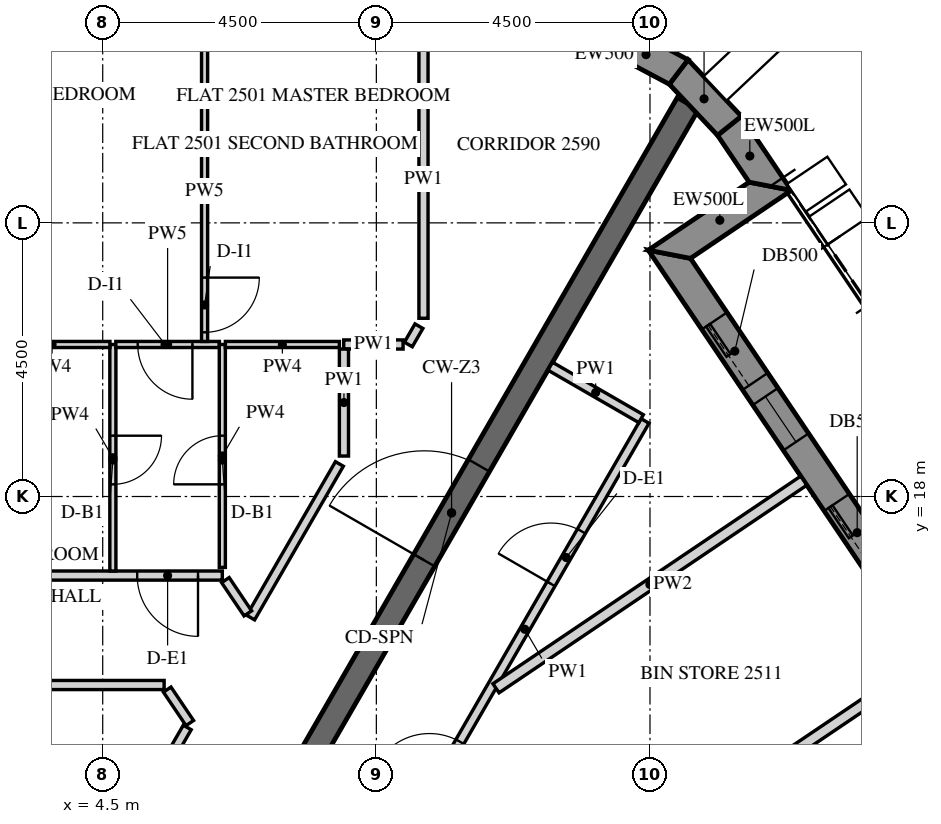
"""IFC4 building model, lengths in metres.
Left out: names, types, materials, properties, quantities, classifications, styles, units other than length and angle.
Written with IfcOpenShell. Run it as: python <this file> out.ifc"""

import sys

from ifc_helpers import new_model, si_unit, direction, frame, frame_2d, origin, place, context, subcontext, project, spatial, polyline, rectangle, outline, extrude, element, fill, save


model = new_model("IFC4")
c1 = context("Model", 3, precision=1e-05, world=origin(), true_north=direction((0.0, 1.0)))
c2 = subcontext(c1, "Body", "Model", "MODEL_VIEW")
j1 = project(units=[si_unit("LENGTHUNIT", "METRE"), si_unit("PLANEANGLEUNIT", "RADIAN")], contexts=[c1])
p1 = place(None, origin())
s1 = spatial("IfcSite", under=j1, at=p1, CompositionType="ELEMENT")
p2 = place(p1, origin())
s2 = spatial("IfcBuilding", under=s1, at=p2, CompositionType="ELEMENT")
p3 = place(p2, frame((0.0, 0.0, 314.7)))
s3 = spatial("IfcBuildingStorey", under=s2, at=p3, CompositionType="ELEMENT", Elevation=314.7)
p4 = place(p3, frame((26.706, 2.879, -0.15), z_axis=(0.0, 0.0, 1.0), x_axis=(-0.559197891507, 0.829034208061, 0.0)))
e1 = element("IfcWall", 1, at=p4, inside=s3, PredefinedType="SOLIDWALL", context=c2, shape_type="SweptSolid", body=[
    extrude(outline(polyline([(0.25, -0.25), (22.795, -0.25), (23.295, 0.25), (-0.25, 0.25), (0.25, -0.25)])), origin(), (0.0, 0.0, 1.0), 3.9),
])
p5 = place(p4, frame((1.323, 0.0, 1.05)))
e2 = element("IfcOpeningElement", 2, at=p5, cuts=e1, PredefinedType="OPENING", context=c2, shape_type="SweptSolid", body=[
    extrude(rectangle(XDim=0.9, YDim=1.5, at=frame_2d((0.45, 0.75))), frame((0.0, 0.26, 0.0), z_axis=(0.0, -1.0, 0.0), x_axis=(1.0, 0.0, 0.0)), (0.0, 0.0, 1.0), 0.52),
])
p6 = place(p4, frame((2.522, 0.0, 0.15)))
e3 = element("IfcOpeningElement", 3, at=p6, cuts=e1, PredefinedType="OPENING", context=c2, shape_type="SweptSolid", body=[
    extrude(rectangle(XDim=1.2, YDim=2.4, at=frame_2d((0.6, 1.2))), frame((0.0, 0.26, 0.0), z_axis=(0.0, -1.0, 0.0), x_axis=(1.0, 0.0, 0.0)), (0.0, 0.0, 1.0), 0.52),
])
p7 = place(p4, frame((4.922, 0.0, 1.05)))
e4 = element("IfcOpeningElement", 4, at=p7, cuts=e1, PredefinedType="OPENING", context=c2, shape_type="SweptSolid", body=[
    extrude(rectangle(XDim=0.9, YDim=1.5, at=frame_2d((0.45, 0.75))), frame((0.0, 0.26, 0.0), z_axis=(0.0, -1.0, 0.0), x_axis=(1.0, 0.0, 0.0)), (0.0, 0.0, 1.0), 0.52),
])
p8 = place(p4, frame((6.122, 0.0, 0.15)))
e5 = element("IfcOpeningElement", 5, at=p8, cuts=e1, PredefinedType="OPENING", context=c2, shape_type="SweptSolid", body=[
    extrude(rectangle(XDim=1.2, YDim=2.4, at=frame_2d((0.6, 1.2))), frame((0.0, 0.26, 0.0), z_axis=(0.0, -1.0, 0.0), x_axis=(1.0, 0.0, 0.0)), (0.0, 0.0, 1.0), 0.52),
])
p9 = place(p4, frame((8.522, 0.0, 1.05)))
e6 = element("IfcOpeningElement", 6, at=p9, cuts=e1, PredefinedType="OPENING", context=c2, shape_type="SweptSolid", body=[
    extrude(rectangle(XDim=0.9, YDim=1.5, at=frame_2d((0.45, 0.75))), frame((0.0, 0.26, 0.0), z_axis=(0.0, -1.0, 0.0), x_axis=(1.0, 0.0, 0.0)), (0.0, 0.0, 1.0), 0.52),
])
p10 = place(p4, frame((9.722, 0.0, 0.15)))
e7 = element("IfcOpeningElement", 7, at=p10, cuts=e1, PredefinedType="OPENING", context=c2, shape_type="SweptSolid", body=[
    extrude(rectangle(XDim=1.2, YDim=2.4, at=frame_2d((0.6, 1.2))), frame((0.0, 0.26, 0.0), z_axis=(0.0, -1.0, 0.0), x_axis=(1.0, 0.0, 0.0)), (0.0, 0.0, 1.0), 0.52),
])
p11 = place(p4, frame((12.122, 0.0, 1.05)))
e8 = element("IfcOpeningElement", 8, at=p11, cuts=e1, PredefinedType="OPENING", context=c2, shape_type="SweptSolid", body=[
    extrude(rectangle(XDim=0.9, YDim=1.5, at=frame_2d((0.45, 0.75))), frame((0.0, 0.26, 0.0), z_axis=(0.0, -1.0, 0.0), x_axis=(1.0, 0.0, 0.0)), (0.0, 0.0, 1.0), 0.52),
])
p12 = place(p4, frame((13.323, 0.0, 0.15)))
e9 = element("IfcOpeningElement", 9, at=p12, cuts=e1, PredefinedType="OPENING", context=c2, shape_type="SweptSolid", body=[
    extrude(rectangle(XDim=1.2, YDim=2.4, at=frame_2d((0.6, 1.2))), frame((0.0, 0.26, 0.0), z_axis=(0.0, -1.0, 0.0), x_axis=(1.0, 0.0, 0.0)), (0.0, 0.0, 1.0), 0.52),
])
p13 = place(p4, frame((15.722, 0.0, 1.05)))
e10 = element("IfcOpeningElement", 10, at=p13, cuts=e1, PredefinedType="OPENING", context=c2, shape_type="SweptSolid", body=[
    extrude(rectangle(XDim=0.9, YDim=1.5, at=frame_2d((0.45, 0.75))), frame((0.0, 0.26, 0.0), z_axis=(0.0, -1.0, 0.0), x_axis=(1.0, 0.0, 0.0)), (0.0, 0.0, 1.0), 0.52),
])
p14 = place(p4, frame((16.922, 0.0, 0.15)))
e11 = element("IfcOpeningElement", 11, at=p14, cuts=e1, PredefinedType="OPENING", context=c2, shape_type="SweptSolid", body=[
    extrude(rectangle(XDim=1.2, YDim=2.4, at=frame_2d((0.6, 1.2))), frame((0.0, 0.26, 0.0), z_axis=(0.0, -1.0, 0.0), x_axis=(1.0, 0.0, 0.0)), (0.0, 0.0, 1.0), 0.52),
])
p15 = place(p4, frame((19.323, 0.0, 1.05)))
e12 = element("IfcOpeningElement", 12, at=p15, cuts=e1, PredefinedType="OPENING", context=c2, shape_type="SweptSolid", body=[
    extrude(rectangle(XDim=0.9, YDim=1.5, at=frame_2d((0.45, 0.75))), frame((0.0, 0.26, 0.0), z_axis=(0.0, -1.0, 0.0), x_axis=(1.0, 0.0, 0.0)), (0.0, 0.0, 1.0), 0.52),
])
p16 = place(p4, frame((20.522, 0.0, 0.15)))
e13 = element("IfcOpeningElement", 13, at=p16, cuts=e1, PredefinedType="OPENING", context=c2, shape_type="SweptSolid", body=[
    extrude(rectangle(XDim=1.2, YDim=2.4, at=frame_2d((0.6, 1.2))), frame((0.0, 0.26, 0.0), z_axis=(0.0, -1.0, 0.0), x_axis=(1.0, 0.0, 0.0)), (0.0, 0.0, 1.0), 0.52),
])
p17 = place(p3, frame((13.819, 21.984, -0.15), z_axis=(0.0, 0.0, 1.0), x_axis=(0.829052389485, 0.559170935841, 0.0)))
e14 = element("IfcWall", 14, at=p17, inside=s3, PredefinedType="SOLIDWALL", context=c2, shape_type="SweptSolid", body=[
    extrude(outline(polyline([(0.25, -0.25), (2.25, -0.25), (1.75, 0.25), (-0.25, 0.25), (0.25, -0.25)])), origin(), (0.0, 0.0, 1.0), 3.9),
])
p18 = place(p3, frame((15.478, 23.102, -0.15), z_axis=(0.0, 0.0, 1.0), x_axis=(-0.559245726333, 0.829001940636, 0.0)))
e15 = element("IfcWall", 15, at=p18, inside=s3, PredefinedType="SOLIDWALL", context=c2, shape_type="SweptSolid", body=[
    extrude(outline(polyline([(-0.25, -0.25), (1.221, -0.25), (1.18, 0.25), (0.25, 0.25), (-0.25, -0.25)])), origin(), (0.0, 0.0, 1.0), 3.9),
])
p19 = place(p3, frame((14.806, 24.097, -0.15), z_axis=(0.0, 0.0, 1.0), x_axis=(-0.686234452793, 0.727380420275, 0.0)))
e16 = element("IfcWall", 16, at=p19, inside=s3, PredefinedType="SOLIDWALL", context=c2, shape_type="SweptSolid", body=[
    extrude(outline(polyline([(-0.021, -0.25), (1.257, -0.25), (1.175, 0.25), (0.021, 0.25), (-0.021, -0.25)])), origin(), (0.0, 0.0, 1.0), 3.9),
])
p20 = place(p3, frame((13.972, 24.982, -0.15), z_axis=(0.0, 0.0, 1.0), x_axis=(-0.882902492938, 0.469556373575, 0.0)))
e17 = element("IfcWall", 17, at=p20, inside=s3, PredefinedType="SOLIDWALL", context=c2, shape_type="SweptSolid", body=[
    extrude(outline(polyline([(-0.041, -0.25), (1.257, -0.25), (1.175, 0.25), (0.041, 0.25), (-0.041, -0.25)])), origin(), (0.0, 0.0, 1.0), 3.9),
])
p21 = place(p3, frame((6.351, 11.0, -0.15), z_axis=(0.0, 0.0, 1.0), x_axis=(0.499998894578, 0.866026041999, 0.0)))
e18 = element("IfcWall", 18, at=p21, inside=s3, PredefinedType="SHEAR", context=c2, shape_type="SweptSolid", body=[
    extrude(rectangle(XDim=15.544, YDim=0.4, at=frame_2d((7.772, 0.0))), origin(), (0.0, 0.0, 1.0), 3.9),
])
p22 = place(p21, frame((6.872, 0.0, 0.15)))
e19 = element("IfcOpeningElement", 19, at=p22, cuts=e18, PredefinedType="OPENING", context=c2, shape_type="SweptSolid", body=[
    extrude(rectangle(XDim=1.8, YDim=2.4, at=frame_2d((0.9, 1.2))), frame((0.0, 0.21, 0.0), z_axis=(0.0, -1.0, 0.0), x_axis=(1.0, 0.0, 0.0)), (0.0, 0.0, 1.0), 0.42),
])
p23 = place(p3, frame((6.467, 16.7, 0.0), z_axis=(0.0, 0.0, 1.0), x_axis=(-1.0, 0.0, 0.0)))
e20 = element("IfcWall", 20, at=p23, inside=s3, PredefinedType="PARTITIONING", context=c2, shape_type="SweptSolid", body=[
    extrude(rectangle(XDim=14.677, YDim=0.15, at=frame_2d((7.339, 0.0))), origin(), (0.0, 0.0, 1.0), 2.988),
])
p24 = place(p23, frame((0.4, 0.0, 0.0)))
e21 = element("IfcOpeningElement", 21, at=p24, cuts=e20, PredefinedType="OPENING", context=c2, shape_type="SweptSolid", body=[
    extrude(rectangle(XDim=1.0, YDim=2.1, at=frame_2d((0.5, 1.05))), frame((0.0, 0.085, 0.0), z_axis=(0.0, -1.0, 0.0), x_axis=(1.0, 0.0, 0.0)), (0.0, 0.0, 1.0), 0.17),
])
p25 = place(p23, frame((13.527, 0.0, 0.0)))
e22 = element("IfcOpeningElement", 22, at=p25, cuts=e20, PredefinedType="OPENING", context=c2, shape_type="SweptSolid", body=[
    extrude(rectangle(XDim=1.0, YDim=2.1, at=frame_2d((0.5, 1.05))), frame((0.0, 0.085, 0.0), z_axis=(0.0, -1.0, 0.0), x_axis=(1.0, 0.0, 0.0)), (0.0, 0.0, 1.0), 0.17),
])
p26 = place(p3, frame((9.775, 25.5, 0.0), z_axis=(0.0, 0.0, 1.0), x_axis=(0.0, -1.0, 0.0)))
e23 = element("IfcWall", 23, at=p26, inside=s3, PredefinedType="PARTITIONING", context=c2, shape_type="SweptSolid", body=[
    extrude(rectangle(XDim=4.569, YDim=0.15, at=frame_2d((2.284, 0.0))), origin(), (0.0, 0.0, 1.0), 2.988),
])
p27 = place(p3, frame((9.7, 20.801, 0.0), z_axis=(0.0, 0.0, 1.0), x_axis=(-0.499762962979, -0.866162213927, 0.0)))
e24 = element("IfcWall", 24, at=p27, inside=s3, PredefinedType="PARTITIONING", context=c2, shape_type="SweptSolid", body=[
    extrude(rectangle(XDim=0.348, YDim=0.15, at=frame_2d((0.174, 0.0))), origin(), (0.0, 0.0, 1.0), 2.988),
])
p28 = place(p3, frame((9.44, 20.5, 0.0), z_axis=(0.0, 0.0, 1.0), x_axis=(-1.0, 0.0, 0.0)))
e25 = element("IfcWall", 25, at=p28, inside=s3, PredefinedType="PARTITIONING", context=c2, shape_type="SweptSolid", body=[
    extrude(rectangle(XDim=0.976, YDim=0.15, at=frame_2d((0.488, 0.0))), origin(), (0.0, 0.0, 1.0), 2.988),
])
p29 = place(p3, frame((8.467, 20.425, 0.0), z_axis=(0.0, 0.0, 1.0), x_axis=(0.0, -1.0, 0.0)))
e26 = element("IfcWall", 26, at=p29, inside=s3, PredefinedType="PARTITIONING", context=c2, shape_type="SweptSolid", body=[
    extrude(rectangle(XDim=1.76, YDim=0.15, at=frame_2d((0.88, 0.0))), origin(), (0.0, 0.0, 1.0), 2.988),
])
p30 = place(p3, frame((8.392, 18.536, 0.0), z_axis=(0.0, 0.0, 1.0), x_axis=(-0.49996389635, -0.866046247233, 0.0)))
e27 = element("IfcWall", 27, at=p30, inside=s3, PredefinedType="PARTITIONING", context=c2, shape_type="SweptSolid", body=[
    extrude(rectangle(XDim=2.918, YDim=0.15, at=frame_2d((1.459, 0.0))), origin(), (0.0, 0.0, 1.0), 2.988),
])
p31 = place(p3, frame((6.887, 16.078, 0.0), z_axis=(0.0, 0.0, 1.0), x_axis=(-0.559472855001, 0.828848674076, 0.0)))
e28 = element("IfcWall", 28, at=p31, inside=s3, PredefinedType="PARTITIONING", context=c2, shape_type="SweptSolid", body=[
    extrude(rectangle(XDim=0.66, YDim=0.15, at=frame_2d((0.33, 0.0))), origin(), (0.0, 0.0, 1.0), 2.988),
])
p32 = place(p3, frame((-7.002, 14.9, 0.0), z_axis=(0.0, 0.0, 1.0), x_axis=(1.0, 0.0, 0.0)))
e29 = element("IfcWall", 29, at=p32, inside=s3, PredefinedType="PARTITIONING", context=c2, shape_type="SweptSolid", body=[
    extrude(rectangle(XDim=12.512, YDim=0.15, at=frame_2d((6.256, 0.0))), origin(), (0.0, 0.0, 1.0), 2.988),
])
p33 = place(p32, frame((5.806, 0.0, 0.0)))
e30 = element("IfcOpeningElement", 30, at=p33, cuts=e29, PredefinedType="OPENING", context=c2, shape_type="SweptSolid", body=[
    extrude(rectangle(XDim=0.9, YDim=2.1, at=frame_2d((0.45, 1.05))), frame((0.0, 0.085, 0.0), z_axis=(0.0, -1.0, 0.0), x_axis=(1.0, 0.0, 0.0)), (0.0, 0.0, 1.0), 0.17),
])
p34 = place(p3, frame((5.561, 14.825, 0.0), z_axis=(0.0, 0.0, 1.0), x_axis=(0.559188682258, -0.829040419784, 0.0)))
e31 = element("IfcWall", 31, at=p34, inside=s3, PredefinedType="PARTITIONING", context=c2, shape_type="SweptSolid", body=[
    extrude(rectangle(XDim=0.664, YDim=0.15, at=frame_2d((0.332, 0.0))), origin(), (0.0, 0.0, 1.0), 2.988),
])
p35 = place(p3, frame((5.89, 14.202, 0.0), z_axis=(0.0, 0.0, 1.0), x_axis=(-0.499986987217, -0.866032916588, 0.0)))
e32 = element("IfcWall", 32, at=p35, inside=s3, PredefinedType="PARTITIONING", context=c2, shape_type="SweptSolid", body=[
    extrude(rectangle(XDim=1.092, YDim=0.15, at=frame_2d((0.546, 0.0))), origin(), (0.0, 0.0, 1.0), 2.988),
])
p36 = place(p3, frame((9.464, 12.392, 0.0), z_axis=(0.0, 0.0, 1.0), x_axis=(0.499999400414, 0.866025749955, 0.0)))
e33 = element("IfcWall", 33, at=p36, inside=s3, PredefinedType="PARTITIONING", context=c2, shape_type="SweptSolid", body=[
    extrude(rectangle(XDim=7.911, YDim=0.15, at=frame_2d((3.955, 0.0))), origin(), (0.0, 0.0, 1.0), 2.988),
])
p37 = place(p36, frame((0.82, 0.0, 0.0)))
e34 = element("IfcOpeningElement", 34, at=p37, cuts=e33, PredefinedType="OPENING", context=c2, shape_type="SweptSolid", body=[
    extrude(rectangle(XDim=1.0, YDim=2.1, at=frame_2d((0.5, 1.05))), frame((0.0, 0.085, 0.0), z_axis=(0.0, -1.0, 0.0), x_axis=(1.0, 0.0, 0.0)), (0.0, 0.0, 1.0), 0.17),
])
p38 = place(p36, frame((4.817, 0.0, 0.0)))
e35 = element("IfcOpeningElement", 35, at=p38, cuts=e33, PredefinedType="OPENING", context=c2, shape_type="SweptSolid", body=[
    extrude(rectangle(XDim=1.0, YDim=2.1, at=frame_2d((0.5, 1.05))), frame((0.0, 0.085, 0.0), z_axis=(0.0, -1.0, 0.0), x_axis=(1.0, 0.0, 0.0)), (0.0, 0.0, 1.0), 0.17),
])
p39 = place(p3, frame((13.354, 19.28, 0.0), z_axis=(0.0, 0.0, 1.0), x_axis=(-0.866074815912, 0.499914405916, 0.0)))
e36 = element("IfcWall", 36, at=p39, inside=s3, PredefinedType="PARTITIONING", context=c2, shape_type="SweptSolid", body=[
    extrude(rectangle(XDim=1.725, YDim=0.15, at=frame_2d((0.862, 0.0))), origin(), (0.0, 0.0, 1.0), 2.988),
])
p40 = place(p3, frame((4.667, 20.5, 0.0), z_axis=(0.0, 0.0, 1.0), x_axis=(0.0, -1.0, 0.0)))
e37 = element("IfcWall", 37, at=p40, inside=s3, PredefinedType="PARTITIONING", context=c2, shape_type="SweptSolid", body=[
    extrude(rectangle(XDim=3.725, YDim=0.1, at=frame_2d((1.863, 0.0))), origin(), (0.0, 0.0, 1.0), 2.988),
])
p41 = place(p40, frame((1.5, 0.0, 0.0)))
e38 = element("IfcOpeningElement", 38, at=p41, cuts=e37, PredefinedType="OPENING", context=c2, shape_type="SweptSolid", body=[
    extrude(rectangle(XDim=0.8, YDim=2.1, at=frame_2d((0.4, 1.05))), frame((0.0, 0.06, 0.0), z_axis=(0.0, -1.0, 0.0), x_axis=(1.0, 0.0, 0.0)), (0.0, 0.0, 1.0), 0.12),
])
p42 = place(p3, frame((6.419, 20.5, 0.0), z_axis=(0.0, 0.0, 1.0), x_axis=(-1.0, 0.0, 0.0)))
e39 = element("IfcWall", 39, at=p42, inside=s3, PredefinedType="PARTITIONING", context=c2, shape_type="SweptSolid", body=[
    extrude(rectangle(XDim=1.704, YDim=0.1, at=frame_2d((0.852, 0.0))), origin(), (0.0, 0.0, 1.0), 2.988),
])
p43 = place(p42, frame((0.444, 0.0, 0.0)))
e40 = element("IfcOpeningElement", 40, at=p43, cuts=e39, PredefinedType="OPENING", context=c2, shape_type="SweptSolid", body=[
    extrude(rectangle(XDim=0.9, YDim=2.1, at=frame_2d((0.45, 1.05))), frame((0.0, 0.06, 0.0), z_axis=(0.0, -1.0, 0.0), x_axis=(1.0, 0.0, 0.0)), (0.0, 0.0, 1.0), 0.12),
])
p44 = place(p3, frame((6.467, 16.834, 0.0), z_axis=(0.0, 0.0, 1.0), x_axis=(0.0, 1.0, 0.0)))
e41 = element("IfcWall", 41, at=p44, inside=s3, PredefinedType="PARTITIONING", context=c2, shape_type="SweptSolid", body=[
    extrude(rectangle(XDim=3.666, YDim=0.1, at=frame_2d((1.833, 0.0))), origin(), (0.0, 0.0, 1.0), 2.988),
])
p45 = place(p44, frame((1.366, 0.0, 0.0)))
e42 = element("IfcOpeningElement", 42, at=p45, cuts=e41, PredefinedType="OPENING", context=c2, shape_type="SweptSolid", body=[
    extrude(rectangle(XDim=0.8, YDim=2.1, at=frame_2d((0.4, 1.05))), frame((0.0, 0.06, 0.0), z_axis=(0.0, -1.0, 0.0), x_axis=(1.0, 0.0, 0.0)), (0.0, 0.0, 1.0), 0.12),
])
p46 = place(p3, frame((4.619, 20.5, 0.0), z_axis=(0.0, 0.0, 1.0), x_axis=(-1.0, 0.0, 0.0)))
e43 = element("IfcWall", 43, at=p46, inside=s3, PredefinedType="PARTITIONING", context=c2, shape_type="SweptSolid", body=[
    extrude(rectangle(XDim=1.904, YDim=0.1, at=frame_2d((0.952, 0.0))), origin(), (0.0, 0.0, 1.0), 2.988),
])
p47 = place(p3, frame((6.175, 25.5, 0.0), z_axis=(0.0, 0.0, 1.0), x_axis=(0.0, -1.0, 0.0)))
e44 = element("IfcWall", 44, at=p47, inside=s3, PredefinedType="PARTITIONING", context=c2, shape_type="SweptSolid", body=[
    extrude(rectangle(XDim=4.95, YDim=0.1, at=frame_2d((2.475, 0.0))), origin(), (0.0, 0.0, 1.0), 2.988),
])
p48 = place(p47, frame((3.9, 0.0, 0.0)))
e45 = element("IfcOpeningElement", 45, at=p48, cuts=e44, PredefinedType="OPENING", context=c2, shape_type="SweptSolid", body=[
    extrude(rectangle(XDim=0.9, YDim=2.1, at=frame_2d((0.45, 1.05))), frame((0.0, 0.06, 0.0), z_axis=(0.0, -1.0, 0.0), x_axis=(1.0, 0.0, 0.0)), (0.0, 0.0, 1.0), 0.12),
])
p49 = place(p3, frame((6.517, 20.5, 0.0), z_axis=(0.0, 0.0, 1.0), x_axis=(1.0, 0.0, 0.0)))
e46 = element("IfcWall", 46, at=p49, inside=s3, PredefinedType="PARTITIONING", context=c2, shape_type="SweptSolid", body=[
    extrude(rectangle(XDim=1.875, YDim=0.1, at=frame_2d((0.938, 0.0))), origin(), (0.0, 0.0, 1.0), 2.988),
])
p50 = place(p3, frame((18.042, 15.276, 0.0), z_axis=(0.0, 0.0, 1.0), x_axis=(-0.829028989438, -0.559205628254, 0.0)))
e47 = element("IfcWall", 47, at=p50, inside=s3, PredefinedType="PARTITIONING", context=c2, shape_type="SweptSolid", body=[
    extrude(rectangle(XDim=8.725, YDim=0.18, at=frame_2d((4.363, 0.0))), origin(), (0.0, 0.0, 1.0), 2.988),
])
p51 = place(p3, frame((16.029, 18.26, 0.0), z_axis=(0.0, 0.0, 1.0), x_axis=(-0.829048418375, -0.559176823545, 0.0)))
e48 = element("IfcWall", 48, at=p51, inside=s3, PredefinedType="PARTITIONING", context=c2, shape_type="SweptSolid", body=[
    extrude(rectangle(XDim=6.105, YDim=0.18, at=frame_2d((3.053, 0.0))), origin(), (0.0, 0.0, 1.0), 2.988),
])
p52 = place(p14, frame((0.0, 0.175, 0.0)))
e49 = element("IfcDoor", 49, at=p52, inside=s3, OperationType="SLIDING_TO_LEFT", PredefinedType="DOOR", context=c2, shape_type="SweptSolid", body=[
    extrude(rectangle(XDim=1.2, YDim=2.4, at=frame_2d((0.6, 1.2))), frame((0.0, 0.025, 0.0), z_axis=(0.0, -1.0, 0.0), x_axis=(1.0, 0.0, 0.0)), (0.0, 0.0, 1.0), 0.05),
])
fill(e11, e49)
p53 = place(p15, frame((0.0, 0.18, 0.0)))
e50 = element("IfcWindow", 50, at=p53, inside=s3, PartitioningType="SINGLE_PANEL", PredefinedType="WINDOW", context=c2, shape_type="SweptSolid", body=[
    extrude(rectangle(XDim=0.9, YDim=1.5, at=frame_2d((0.45, 0.75))), frame((0.0, 0.03, 0.0), z_axis=(0.0, -1.0, 0.0), x_axis=(1.0, 0.0, 0.0)), (0.0, 0.0, 1.0), 0.06),
])
fill(e12, e50)
p54 = place(p16, frame((0.0, 0.175, 0.0)))
e51 = element("IfcDoor", 51, at=p54, inside=s3, OperationType="SLIDING_TO_LEFT", PredefinedType="DOOR", context=c2, shape_type="SweptSolid", body=[
    extrude(rectangle(XDim=1.2, YDim=2.4, at=frame_2d((0.6, 1.2))), frame((0.0, 0.025, 0.0), z_axis=(0.0, -1.0, 0.0), x_axis=(1.0, 0.0, 0.0)), (0.0, 0.0, 1.0), 0.05),
])
fill(e13, e51)
p55 = place(p22, origin())
e52 = element("IfcDoor", 52, at=p55, inside=s3, OperationType="DOUBLE_DOOR_SINGLE_SWING", PredefinedType="DOOR", context=c2, shape_type="SweptSolid", body=[
    extrude(rectangle(XDim=1.8, YDim=2.4, at=frame_2d((0.9, 1.2))), frame((0.0, 0.025, 0.0), z_axis=(0.0, -1.0, 0.0), x_axis=(1.0, 0.0, 0.0)), (0.0, 0.0, 1.0), 0.05),
])
fill(e19, e52)
p56 = place(p24, origin())
e53 = element("IfcDoor", 53, at=p56, inside=s3, OperationType="SINGLE_SWING_RIGHT", PredefinedType="DOOR", context=c2, shape_type="SweptSolid", body=[
    extrude(rectangle(XDim=1.0, YDim=2.1, at=frame_2d((0.5, 1.05))), frame((0.0, 0.025, 0.0), z_axis=(0.0, -1.0, 0.0), x_axis=(1.0, 0.0, 0.0)), (0.0, 0.0, 1.0), 0.05),
])
fill(e21, e53)
p57 = place(p41, origin())
e54 = element("IfcDoor", 54, at=p57, inside=s3, OperationType="SINGLE_SWING_LEFT", PredefinedType="DOOR", context=c2, shape_type="SweptSolid", body=[
    extrude(rectangle(XDim=0.8, YDim=2.1, at=frame_2d((0.4, 1.05))), frame((0.0, 0.025, 0.0), z_axis=(0.0, -1.0, 0.0), x_axis=(1.0, 0.0, 0.0)), (0.0, 0.0, 1.0), 0.05),
])
fill(e38, e54)
p58 = place(p43, origin())
e55 = element("IfcDoor", 55, at=p58, inside=s3, OperationType="SINGLE_SWING_RIGHT", PredefinedType="DOOR", context=c2, shape_type="SweptSolid", body=[
    extrude(rectangle(XDim=0.9, YDim=2.1, at=frame_2d((0.45, 1.05))), frame((0.0, 0.025, 0.0), z_axis=(0.0, -1.0, 0.0), x_axis=(1.0, 0.0, 0.0)), (0.0, 0.0, 1.0), 0.05),
])
fill(e40, e55)
p59 = place(p48, origin())
e56 = element("IfcDoor", 56, at=p59, inside=s3, OperationType="SINGLE_SWING_RIGHT", PredefinedType="DOOR", context=c2, shape_type="SweptSolid", body=[
    extrude(rectangle(XDim=0.9, YDim=2.1, at=frame_2d((0.45, 1.05))), frame((0.0, 0.025, 0.0), z_axis=(0.0, -1.0, 0.0), x_axis=(1.0, 0.0, 0.0)), (0.0, 0.0, 1.0), 0.05),
])
fill(e45, e56)
p60 = place(p45, origin())
e57 = element("IfcDoor", 57, at=p60, inside=s3, OperationType="SINGLE_SWING_RIGHT", PredefinedType="DOOR", context=c2, shape_type="SweptSolid", body=[
    extrude(rectangle(XDim=0.8, YDim=2.1, at=frame_2d((0.4, 1.05))), frame((0.0, 0.025, 0.0), z_axis=(0.0, -1.0, 0.0), x_axis=(1.0, 0.0, 0.0)), (0.0, 0.0, 1.0), 0.05),
])
fill(e42, e57)
p61 = place(p37, origin())
e58 = element("IfcDoor", 58, at=p61, inside=s3, OperationType="SINGLE_SWING_RIGHT", PredefinedType="DOOR", context=c2, shape_type="SweptSolid", body=[
    extrude(rectangle(XDim=1.0, YDim=2.1, at=frame_2d((0.5, 1.05))), frame((0.0, 0.025, 0.0), z_axis=(0.0, -1.0, 0.0), x_axis=(1.0, 0.0, 0.0)), (0.0, 0.0, 1.0), 0.05),
])
fill(e34, e58)
p62 = place(p38, origin())
e59 = element("IfcDoor", 59, at=p62, inside=s3, OperationType="SINGLE_SWING_LEFT", PredefinedType="DOOR", context=c2, shape_type="SweptSolid", body=[
    extrude(rectangle(XDim=1.0, YDim=2.1, at=frame_2d((0.5, 1.05))), frame((0.0, 0.025, 0.0), z_axis=(0.0, -1.0, 0.0), x_axis=(1.0, 0.0, 0.0)), (0.0, 0.0, 1.0), 0.05),
])
fill(e35, e59)
save(model, sys.argv[1])
